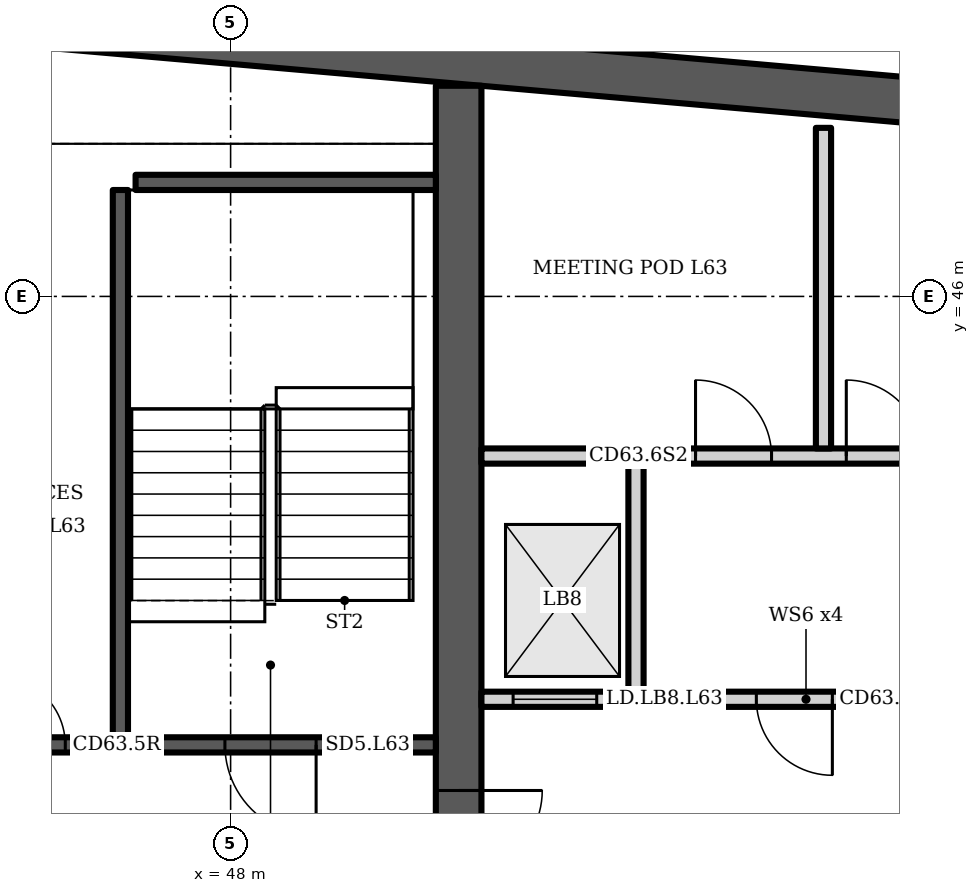
"""IFC4 building model, lengths in metres.
Left out: names, types, materials, properties, quantities, classifications, styles, units other than length and angle.
Written with IfcOpenShell. Run it as: python <this file> out.ifc"""

import sys

from ifc_helpers import new_model, si_unit, direction, frame, frame_2d, origin, place, context, subcontext, project, spatial, polyline, rectangle, outline, extrude, element, fill, save


model = new_model("IFC4")
c1 = context("Model", 3, precision=1e-05, world=origin(), true_north=direction((0.0, 1.0)))
c2 = subcontext(c1, "Body", "Model", "MODEL_VIEW")
j1 = project(units=[si_unit("LENGTHUNIT", "METRE"), si_unit("PLANEANGLEUNIT", "RADIAN")], contexts=[c1])
p1 = place(None, origin())
s1 = spatial("IfcSite", under=j1, at=p1, CompositionType="ELEMENT")
p2 = place(p1, origin())
s2 = spatial("IfcBuilding", under=s1, at=p2, CompositionType="ELEMENT")
p3 = place(p2, frame((0.0, 0.0, 250.3)))
s3 = spatial("IfcBuildingStorey", under=s2, at=p3, CompositionType="ELEMENT", Elevation=250.3)
p4 = place(p3, frame((0.0, 0.0, -0.0)))
e1 = element("IfcWall", 1, at=p4, inside=s3, PredefinedType="SHEAR", context=c2, shape_type="SweptSolid", body=[
    extrude(outline(polyline([(23.0, 48.185), (40.5, 49.716), (58.0, 48.185), (58.0, 48.787), (40.5, 50.318), (23.0, 48.787), (23.0, 48.185)])), origin(), (0.0, 0.0, 1.0), 3.6),
])
p5 = place(p3, frame((51.0, 34.6, 0.0), z_axis=(0.0, 0.0, 1.0), x_axis=(0.0, 1.0, 0.0)))
e2 = element("IfcWall", 2, at=p5, inside=s3, PredefinedType="SHEAR", context=c2, shape_type="SweptSolid", body=[
    extrude(rectangle(XDim=14.171, YDim=0.6, at=frame_2d((7.085, 0.0))), origin(), (0.0, 0.0, 1.0), 3.6),
])
p6 = place(p5, frame((3.8, 0.0, 0.0)))
e3 = element("IfcOpeningElement", 3, at=p6, cuts=e2, PredefinedType="OPENING", context=c2, shape_type="SweptSolid", body=[
    extrude(rectangle(XDim=1.1, YDim=2.1, at=frame_2d((0.55, 1.05))), frame((0.0, 0.31, 0.0), z_axis=(0.0, -1.0, 0.0), x_axis=(1.0, 0.0, 0.0)), (0.0, 0.0, 1.0), 0.62),
])
p7 = place(p3, frame((44.3, 40.1, 0.0), z_axis=(0.0, 0.0, 1.0), x_axis=(1.0, 0.0, 0.0)))
e4 = element("IfcWall", 4, at=p7, inside=s3, PredefinedType="SHEAR", context=c2, shape_type="SweptSolid", body=[
    extrude(rectangle(XDim=6.4, YDim=0.2, at=frame_2d((3.2, 0.0))), origin(), (0.0, 0.0, 1.0), 3.2),
])
p8 = place(p7, frame((3.625, 0.0, 0.0)))
e5 = element("IfcOpeningElement", 5, at=p8, cuts=e4, PredefinedType="OPENING", context=c2, shape_type="SweptSolid", body=[
    extrude(rectangle(XDim=1.2, YDim=2.1, at=frame_2d((0.6, 1.05))), frame((0.0, 0.11, 0.0), z_axis=(0.0, -1.0, 0.0), x_axis=(1.0, 0.0, 0.0)), (0.0, 0.0, 1.0), 0.22),
])
p9 = place(p7, frame((0.625, 0.0, 0.0)))
e6 = element("IfcOpeningElement", 6, at=p9, cuts=e4, PredefinedType="OPENING", context=c2, shape_type="SweptSolid", body=[
    extrude(rectangle(XDim=0.9, YDim=2.1, at=frame_2d((0.45, 1.05))), frame((0.0, 0.11, 0.0), z_axis=(0.0, -1.0, 0.0), x_axis=(1.0, 0.0, 0.0)), (0.0, 0.0, 1.0), 0.22),
])
p10 = place(p3, frame((46.55, 40.2, 0.0), z_axis=(0.0, 0.0, 1.0), x_axis=(0.0, 1.0, 0.0)))
e7 = element("IfcWall", 7, at=p10, inside=s3, PredefinedType="SHEAR", context=c2, shape_type="SweptSolid", body=[
    extrude(rectangle(XDim=7.2, YDim=0.2, at=frame_2d((3.6, 0.0))), origin(), (0.0, 0.0, 1.0), 3.2),
])
p11 = place(p3, frame((46.75, 47.5, 0.0), z_axis=(0.0, 0.0, 1.0), x_axis=(1.0, 0.0, 0.0)))
e8 = element("IfcWall", 8, at=p11, inside=s3, PredefinedType="SHEAR", context=c2, shape_type="SweptSolid", body=[
    extrude(rectangle(XDim=3.95, YDim=0.2, at=frame_2d((1.975, 0.0))), origin(), (0.0, 0.0, 1.0), 3.2),
])
p12 = place(p3, frame((51.3, 40.7, 0.0), z_axis=(0.0, 0.0, 1.0), x_axis=(1.0, 0.0, 0.0)))
e9 = element("IfcWall", 9, at=p12, inside=s3, PredefinedType="PARTITIONING", context=c2, shape_type="SweptSolid", body=[
    extrude(rectangle(XDim=6.1, YDim=0.2, at=frame_2d((3.05, 0.0))), origin(), (0.0, 0.0, 1.0), 3.2),
])
p13 = place(p12, frame((0.417, 0.0, 0.0)))
e10 = element("IfcOpeningElement", 10, at=p13, cuts=e9, PredefinedType="OPENING", context=c2, shape_type="SweptSolid", body=[
    extrude(rectangle(XDim=1.1, YDim=2.1, at=frame_2d((0.55, 1.05))), frame((0.0, 0.11, 0.0), z_axis=(0.0, -1.0, 0.0), x_axis=(1.0, 0.0, 0.0)), (0.0, 0.0, 1.0), 0.22),
])
p14 = place(p12, frame((3.617, 0.0, 0.0)))
e11 = element("IfcOpeningElement", 11, at=p14, cuts=e9, PredefinedType="OPENING", context=c2, shape_type="SweptSolid", body=[
    extrude(rectangle(XDim=1.0, YDim=2.1, at=frame_2d((0.5, 1.05))), frame((0.0, 0.11, 0.0), z_axis=(0.0, -1.0, 0.0), x_axis=(1.0, 0.0, 0.0)), (0.0, 0.0, 1.0), 0.22),
])
p15 = place(p3, frame((51.3, 43.9, 0.0), z_axis=(0.0, 0.0, 1.0), x_axis=(1.0, 0.0, 0.0)))
e12 = element("IfcWall", 12, at=p15, inside=s3, PredefinedType="PARTITIONING", context=c2, shape_type="SweptSolid", body=[
    extrude(rectangle(XDim=6.1, YDim=0.2, at=frame_2d((3.05, 0.0))), origin(), (0.0, 0.0, 1.0), 3.2),
])
p16 = place(p15, frame((2.817, 0.0, 0.0)))
e13 = element("IfcOpeningElement", 13, at=p16, cuts=e12, PredefinedType="OPENING", context=c2, shape_type="SweptSolid", body=[
    extrude(rectangle(XDim=1.0, YDim=2.1, at=frame_2d((0.5, 1.05))), frame((0.0, 0.11, 0.0), z_axis=(0.0, -1.0, 0.0), x_axis=(1.0, 0.0, 0.0)), (0.0, 0.0, 1.0), 0.22),
])
p17 = place(p15, frame((4.8, 0.0, 0.0)))
e14 = element("IfcOpeningElement", 14, at=p17, cuts=e12, PredefinedType="OPENING", context=c2, shape_type="SweptSolid", body=[
    extrude(rectangle(XDim=1.0, YDim=2.1, at=frame_2d((0.5, 1.05))), frame((0.0, 0.11, 0.0), z_axis=(0.0, -1.0, 0.0), x_axis=(1.0, 0.0, 0.0)), (0.0, 0.0, 1.0), 0.22),
])
p18 = place(p3, frame((0.0, 0.0, -0.0)))
e15 = element("IfcWall", 15, at=p18, inside=s3, PredefinedType="PARTITIONING", context=c2, shape_type="SweptSolid", body=[
    extrude(outline(polyline([(53.433, 40.8), (53.433, 43.8), (53.233, 43.8), (53.233, 40.8), (53.433, 40.8)])), origin(), (0.0, 0.0, 1.0), 3.2),
])
p19 = place(p3, frame((55.8, 44.0, 0.0), z_axis=(0.0, 0.0, 1.0), x_axis=(0.0, 1.0, 0.0)))
e16 = element("IfcWall", 16, at=p19, inside=s3, PredefinedType="PARTITIONING", context=c2, shape_type="SweptSolid", body=[
    extrude(rectangle(XDim=4.218, YDim=0.2, at=frame_2d((2.109, 0.0))), origin(), (0.0, 0.0, 1.0), 3.2),
])
p20 = place(p8, origin())
e17 = element("IfcDoor", 17, at=p20, inside=s3, OperationType="SINGLE_SWING_RIGHT", PredefinedType="DOOR", context=c2, shape_type="SweptSolid", body=[
    extrude(rectangle(XDim=1.2, YDim=2.1, at=frame_2d((0.6, 1.05))), frame((0.0, 0.025, 0.0), z_axis=(0.0, -1.0, 0.0), x_axis=(1.0, 0.0, 0.0)), (0.0, 0.0, 1.0), 0.05),
])
fill(e5, e17)
p21 = place(p9, origin())
e18 = element("IfcDoor", 18, at=p21, inside=s3, OperationType="SINGLE_SWING_LEFT", PredefinedType="DOOR", context=c2, shape_type="SweptSolid", body=[
    extrude(rectangle(XDim=0.9, YDim=2.1, at=frame_2d((0.45, 1.05))), frame((0.0, 0.025, 0.0), z_axis=(0.0, -1.0, 0.0), x_axis=(1.0, 0.0, 0.0)), (0.0, 0.0, 1.0), 0.05),
])
fill(e6, e18)
p22 = place(p13, origin())
e19 = element("IfcDoor", 19, at=p22, inside=s3, OperationType="DOUBLE_DOOR_SLIDING", PredefinedType="DOOR", context=c2, shape_type="SweptSolid", body=[
    extrude(rectangle(XDim=1.1, YDim=2.1, at=frame_2d((0.55, 1.05))), frame((0.0, 0.025, 0.0), z_axis=(0.0, -1.0, 0.0), x_axis=(1.0, 0.0, 0.0)), (0.0, 0.0, 1.0), 0.05),
])
fill(e10, e19)
p23 = place(p14, origin())
e20 = element("IfcDoor", 20, at=p23, inside=s3, OperationType="SINGLE_SWING_RIGHT", PredefinedType="DOOR", context=c2, shape_type="SweptSolid", body=[
    extrude(rectangle(XDim=1.0, YDim=2.1, at=frame_2d((0.5, 1.05))), frame((0.0, 0.025, 0.0), z_axis=(0.0, -1.0, 0.0), x_axis=(1.0, 0.0, 0.0)), (0.0, 0.0, 1.0), 0.05),
])
fill(e11, e20)
p24 = place(p16, origin())
e21 = element("IfcDoor", 21, at=p24, inside=s3, OperationType="SINGLE_SWING_LEFT", PredefinedType="DOOR", context=c2, shape_type="SweptSolid", body=[
    extrude(rectangle(XDim=1.0, YDim=2.1, at=frame_2d((0.5, 1.05))), frame((0.0, 0.025, 0.0), z_axis=(0.0, -1.0, 0.0), x_axis=(1.0, 0.0, 0.0)), (0.0, 0.0, 1.0), 0.05),
])
fill(e13, e21)
p25 = place(p17, origin())
e22 = element("IfcDoor", 22, at=p25, inside=s3, OperationType="SINGLE_SWING_LEFT", PredefinedType="DOOR", context=c2, shape_type="SweptSolid", body=[
    extrude(rectangle(XDim=1.0, YDim=2.1, at=frame_2d((0.5, 1.05))), frame((0.0, 0.025, 0.0), z_axis=(0.0, -1.0, 0.0), x_axis=(1.0, 0.0, 0.0)), (0.0, 0.0, 1.0), 0.05),
])
fill(e14, e22)
p26 = place(p6, origin())
e23 = element("IfcDoor", 23, at=p26, inside=s3, OperationType="SINGLE_SWING_RIGHT", PredefinedType="DOOR", context=c2, shape_type="SweptSolid", body=[
    extrude(rectangle(XDim=1.1, YDim=2.1, at=frame_2d((0.55, 1.05))), frame((0.0, 0.025, 0.0), z_axis=(0.0, -1.0, 0.0), x_axis=(1.0, 0.0, 0.0)), (0.0, 0.0, 1.0), 0.05),
])
fill(e3, e23)
save(model, sys.argv[1])
